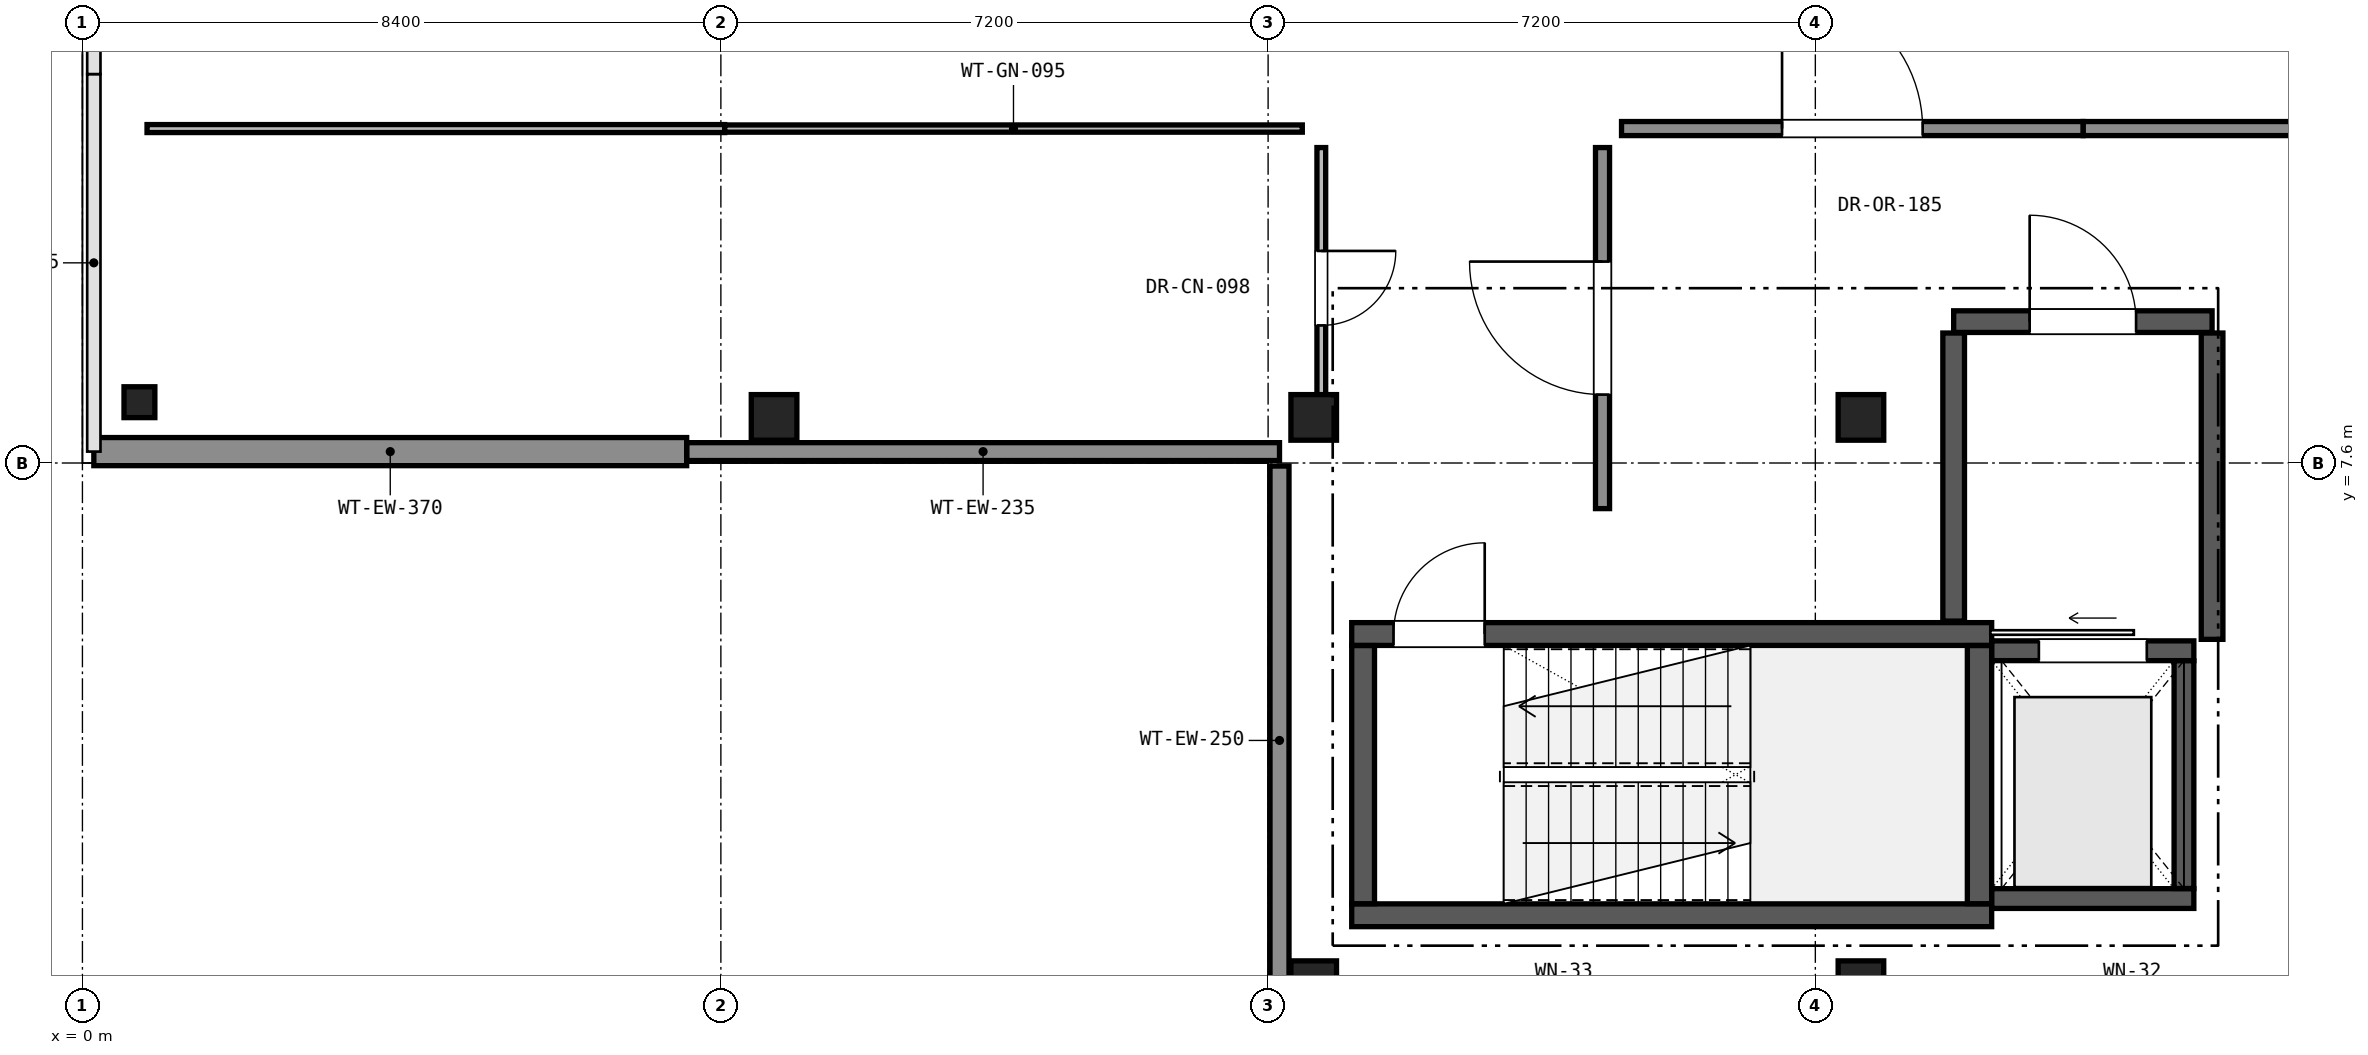
"""IFC4 building model, lengths in metres.
Left out: names, types, materials, properties, quantities, classifications, styles, units other than length and angle.
Written with IfcOpenShell. Run it as: python <this file> out.ifc"""

import sys

from ifc_helpers import new_model, si_unit, direction, frame, frame_2d, origin, origin_2d, place, context, subcontext, project, spatial, rectangle, hollow_circle, extrude, element, fill, save


model = new_model("IFC4")
c1 = context("Model", 3, precision=1e-05, world=origin(), true_north=direction((0.0, 1.0)))
c2 = subcontext(c1, "Body", "Model", "MODEL_VIEW")
j1 = project(units=[si_unit("LENGTHUNIT", "METRE"), si_unit("PLANEANGLEUNIT", "RADIAN")], contexts=[c1])
p1 = place(None, origin())
s1 = spatial("IfcSite", under=j1, at=p1, CompositionType="ELEMENT")
p2 = place(p1, origin())
s2 = spatial("IfcBuilding", under=s1, at=p2, CompositionType="ELEMENT")
p3 = place(p2, frame((0.0, 0.0, 13.6)))
s3 = spatial("IfcBuildingStorey", under=s2, at=p3, CompositionType="ELEMENT", Elevation=13.6)
p4 = place(p3, frame((0.75, 8.4, 0.0), z_axis=(0.0, 0.0, 1.0), x_axis=(1.0, 0.0, 0.0)))
e1 = element("IfcColumn", 1, at=p4, inside=s3, PredefinedType="COLUMN", context=c2, shape_type="SweptSolid", body=[
    extrude(hollow_circle(Radius=0.203, WallThickness=0.016, at=origin_2d()), origin(), (0.0, 0.0, 1.0), 4.08),
])
for number, where, z_axis, x_axis in (
    (2, (9.1, 8.2, 0.0), (0.0, 0.0, 1.0), (1.0, 0.0, 0.0)),
    (3, (16.2, 0.75, 0.0), (0.0, 0.0, 1.0), (1.0, 0.0, 0.0)),
    (4, (16.2, 8.2, 0.0), (0.0, 0.0, 1.0), (1.0, 0.0, 0.0)),
    (5, (23.4, 0.75, 0.0), (0.0, 0.0, 1.0), (1.0, 0.0, 0.0)),
    (6, (23.4, 8.2, 0.0), (0.0, 0.0, 1.0), (1.0, 0.0, 0.0)),
):
    element("IfcColumn", number, at=place(p3, frame(where, z_axis=z_axis, x_axis=x_axis)), inside=s3, PredefinedType="COLUMN", context=c2, shape_type="SweptSolid", body=[
        extrude(rectangle(XDim=0.6, YDim=0.6, at=origin_2d()), origin(), (0.0, 0.0, 1.0), 4.08),
    ])
p5 = place(p3, frame((15.75, 0.34, 0.0), z_axis=(0.0, 0.0, 1.0), x_axis=(0.0, 1.0, 0.0)))
e7 = element("IfcWall", 7, at=p5, inside=s3, PredefinedType="SOLIDWALL", context=c2, shape_type="SweptSolid", body=[
    extrude(rectangle(XDim=7.22, YDim=0.25, at=frame_2d((3.61, 0.0))), origin(), (0.0, 0.0, 1.0), 3.72),
])
p6 = place(p3, frame((15.75, 7.75, 0.0), z_axis=(0.0, 0.0, 1.0), x_axis=(-1.0, 0.0, 0.0)))
e8 = element("IfcWall", 8, at=p6, inside=s3, PredefinedType="SOLIDWALL", context=c2, shape_type="SweptSolid", body=[
    extrude(rectangle(XDim=7.8, YDim=0.235, at=frame_2d((3.9, 0.0))), origin(), (0.0, 0.0, 1.0), 3.72),
])
p7 = place(p3, frame((7.95, 7.75, 0.0), z_axis=(0.0, 0.0, 1.0), x_axis=(-1.0, 0.0, 0.0)))
e9 = element("IfcWall", 9, at=p7, inside=s3, PredefinedType="SOLIDWALL", context=c2, shape_type="SweptSolid", body=[
    extrude(rectangle(XDim=7.8, YDim=0.37, at=frame_2d((3.9, 0.0))), origin(), (0.0, 0.0, 1.0), 3.72),
])
p8 = place(p3, frame((16.7, 1.65, 0.0), z_axis=(0.0, 0.0, 1.0), x_axis=(1.0, 0.0, 0.0)))
e10 = element("IfcWall", 10, at=p8, inside=s3, PredefinedType="SHEAR", context=c2, shape_type="SweptSolid", body=[
    extrude(rectangle(XDim=8.42, YDim=0.3, at=frame_2d((4.21, 0.0))), origin(), (0.0, 0.0, 1.0), 3.72),
])
p9 = place(p3, frame((16.7, 5.35, 0.0), z_axis=(0.0, 0.0, 1.0), x_axis=(1.0, 0.0, 0.0)))
e11 = element("IfcWall", 11, at=p9, inside=s3, PredefinedType="SHEAR", context=c2, shape_type="SweptSolid", body=[
    extrude(rectangle(XDim=8.42, YDim=0.3, at=frame_2d((4.21, 0.0))), origin(), (0.0, 0.0, 1.0), 3.72),
])
p10 = place(p9, frame((0.55, 0.0, 0.0)))
e12 = element("IfcOpeningElement", 12, at=p10, cuts=e11, PredefinedType="OPENING", context=c2, shape_type="SweptSolid", body=[
    extrude(rectangle(XDim=1.2, YDim=2.2, at=frame_2d((0.6, 1.1))), frame((0.0, 0.16, 0.0), z_axis=(0.0, -1.0, 0.0), x_axis=(1.0, 0.0, 0.0)), (0.0, 0.0, 1.0), 0.32),
])
p11 = place(p3, frame((16.85, 1.802, 0.0), z_axis=(0.0, 0.0, 1.0), x_axis=(0.0, 1.0, 0.0)))
e13 = element("IfcWall", 13, at=p11, inside=s3, PredefinedType="SHEAR", context=c2, shape_type="SweptSolid", body=[
    extrude(rectangle(XDim=3.396, YDim=0.3, at=frame_2d((1.698, 0.0))), origin(), (0.0, 0.0, 1.0), 3.72),
])
p12 = place(p3, frame((24.96, 1.802, 0.0), z_axis=(0.0, 0.0, 1.0), x_axis=(0.0, 1.0, 0.0)))
e14 = element("IfcWall", 14, at=p12, inside=s3, PredefinedType="SHEAR", context=c2, shape_type="SweptSolid", body=[
    extrude(rectangle(XDim=3.396, YDim=0.32, at=frame_2d((1.698, 0.0))), origin(), (0.0, 0.0, 1.0), 3.72),
])
p13 = place(p3, frame((25.122, 1.87, 0.0), z_axis=(0.0, 0.0, 1.0), x_axis=(1.0, 0.0, 0.0)))
e15 = element("IfcWall", 15, at=p13, inside=s3, PredefinedType="SHEAR", context=c2, shape_type="SweptSolid", body=[
    extrude(rectangle(XDim=2.658, YDim=0.26, at=frame_2d((1.329, 0.0))), origin(), (0.0, 0.0, 1.0), 3.72),
])
p14 = place(p3, frame((25.122, 5.13, 0.0), z_axis=(0.0, 0.0, 1.0), x_axis=(1.0, 0.0, 0.0)))
e16 = element("IfcWall", 16, at=p14, inside=s3, PredefinedType="SHEAR", context=c2, shape_type="SweptSolid", body=[
    extrude(rectangle(XDim=2.658, YDim=0.26, at=frame_2d((1.329, 0.0))), origin(), (0.0, 0.0, 1.0), 3.72),
])
p15 = place(p14, frame((0.619, 0.0, 0.0)))
e17 = element("IfcOpeningElement", 17, at=p15, cuts=e16, PredefinedType="OPENING", context=c2, shape_type="SweptSolid", body=[
    extrude(rectangle(XDim=1.42, YDim=2.25, at=frame_2d((0.71, 1.125))), frame((0.0, 0.14, 0.0), z_axis=(0.0, -1.0, 0.0), x_axis=(1.0, 0.0, 0.0)), (0.0, 0.0, 1.0), 0.28),
])
p16 = place(p3, frame((27.65, 2.002, 0.0), z_axis=(0.0, 0.0, 1.0), x_axis=(0.0, 1.0, 0.0)))
e18 = element("IfcWall", 18, at=p16, inside=s3, PredefinedType="SHEAR", context=c2, shape_type="SweptSolid", body=[
    extrude(rectangle(XDim=2.996, YDim=0.26, at=frame_2d((1.498, 0.0))), origin(), (0.0, 0.0, 1.0), 3.72),
])
p17 = place(p3, frame((24.62, 9.46, 0.0), z_axis=(0.0, 0.0, 1.0), x_axis=(1.0, 0.0, 0.0)))
e19 = element("IfcWall", 19, at=p17, inside=s3, PredefinedType="SHEAR", context=c2, shape_type="SweptSolid", body=[
    extrude(rectangle(XDim=3.4, YDim=0.285, at=frame_2d((1.7, 0.0))), origin(), (0.0, 0.0, 1.0), 3.72),
])
p18 = place(p17, frame((1.0, 0.0, 0.0)))
e20 = element("IfcOpeningElement", 20, at=p18, cuts=e19, PredefinedType="OPENING", context=c2, shape_type="SweptSolid", body=[
    extrude(rectangle(XDim=1.4, YDim=2.25, at=frame_2d((0.7, 1.125))), frame((0.0, 0.152, 0.0), z_axis=(0.0, -1.0, 0.0), x_axis=(1.0, 0.0, 0.0)), (0.0, 0.0, 1.0), 0.305),
])
p19 = place(p3, frame((24.62, 5.52, 0.0), z_axis=(0.0, 0.0, 1.0), x_axis=(0.0, 1.0, 0.0)))
e21 = element("IfcWall", 21, at=p19, inside=s3, PredefinedType="SHEAR", context=c2, shape_type="SweptSolid", body=[
    extrude(rectangle(XDim=3.79, YDim=0.285, at=frame_2d((1.895, 0.0))), origin(), (0.0, 0.0, 1.0), 2.77),
])
p20 = place(p3, frame((28.02, 5.28, 0.0), z_axis=(0.0, 0.0, 1.0), x_axis=(0.0, 1.0, 0.0)))
e22 = element("IfcWall", 22, at=p20, inside=s3, PredefinedType="SHEAR", context=c2, shape_type="SweptSolid", body=[
    extrude(rectangle(XDim=4.03, YDim=0.285, at=frame_2d((2.015, 0.0))), origin(), (0.0, 0.0, 1.0), 2.77),
])
p21 = place(p3, frame((20.0, 7.0, 0.0), z_axis=(0.0, 0.0, 1.0), x_axis=(0.0, 1.0, 0.0)))
e23 = element("IfcWall", 23, at=p21, inside=s3, PredefinedType="PARTITIONING", context=c2, shape_type="SweptSolid", body=[
    extrude(rectangle(XDim=4.75, YDim=0.185, at=frame_2d((2.375, 0.0))), origin(), (0.0, 0.0, 1.0), 2.77),
])
p22 = place(p21, frame((1.5, 0.0, 0.0)))
e24 = element("IfcOpeningElement", 24, at=p22, cuts=e23, PredefinedType="OPENING", context=c2, shape_type="SweptSolid", body=[
    extrude(rectangle(XDim=1.75, YDim=2.4, at=frame_2d((0.875, 1.2))), frame((0.0, 0.103, 0.0), z_axis=(0.0, -1.0, 0.0), x_axis=(1.0, 0.0, 0.0)), (0.0, 0.0, 1.0), 0.205),
])
p23 = place(p3, frame((20.25, 12.0, 0.0), z_axis=(0.0, 0.0, 1.0), x_axis=(1.0, 0.0, 0.0)))
e25 = element("IfcWall", 25, at=p23, inside=s3, PredefinedType="PARTITIONING", context=c2, shape_type="SweptSolid", body=[
    extrude(rectangle(XDim=6.075, YDim=0.185, at=frame_2d((3.038, 0.0))), origin(), (0.0, 0.0, 1.0), 3.17),
])
p24 = place(p23, frame((2.112, 0.0, 0.0)))
e26 = element("IfcOpeningElement", 26, at=p24, cuts=e25, PredefinedType="OPENING", context=c2, shape_type="SweptSolid", body=[
    extrude(rectangle(XDim=1.85, YDim=2.4, at=frame_2d((0.925, 1.2))), frame((0.0, 0.103, 0.0), z_axis=(0.0, -1.0, 0.0), x_axis=(1.0, 0.0, 0.0)), (0.0, 0.0, 1.0), 0.205),
])
p25 = place(p3, frame((26.325, 12.0, 0.0), z_axis=(0.0, 0.0, 1.0), x_axis=(1.0, 0.0, 0.0)))
e27 = element("IfcWall", 27, at=p25, inside=s3, PredefinedType="PARTITIONING", context=c2, shape_type="SweptSolid", body=[
    extrude(rectangle(XDim=6.075, YDim=0.185, at=frame_2d((3.038, 0.0))), origin(), (0.0, 0.0, 1.0), 3.02),
])
p26 = place(p3, frame((16.3, 11.75, 0.0), z_axis=(0.0, 0.0, 1.0), x_axis=(0.0, -1.0, 0.0)))
e28 = element("IfcWall", 28, at=p26, inside=s3, PredefinedType="PARTITIONING", context=c2, shape_type="SweptSolid", body=[
    extrude(rectangle(XDim=3.7, YDim=0.115, at=frame_2d((1.85, 0.0))), origin(), (0.0, 0.0, 1.0), 2.77),
])
p27 = place(p26, frame((1.36, 0.0, 0.0)))
e29 = element("IfcOpeningElement", 29, at=p27, cuts=e28, PredefinedType="OPENING", context=c2, shape_type="SweptSolid", body=[
    extrude(rectangle(XDim=0.98, YDim=2.15, at=frame_2d((0.49, 1.075))), frame((0.0, 0.067, 0.0), z_axis=(0.0, -1.0, 0.0), x_axis=(1.0, 0.0, 0.0)), (0.0, 0.0, 1.0), 0.135),
])
p28 = place(p3, frame((0.85, 12.0, 0.0), z_axis=(0.0, 0.0, 1.0), x_axis=(1.0, 0.0, 0.0)))
e30 = element("IfcWall", 30, at=p28, inside=s3, PredefinedType="PARTITIONING", context=c2, shape_type="SweptSolid", body=[
    extrude(rectangle(XDim=7.6, YDim=0.105, at=frame_2d((3.8, 0.0))), origin(), (0.0, 0.0, 1.0), 3.31),
])
p29 = place(p3, frame((8.45, 12.0, 0.0), z_axis=(0.0, 0.0, 1.0), x_axis=(1.0, 0.0, 0.0)))
e31 = element("IfcWall", 31, at=p29, inside=s3, PredefinedType="PARTITIONING", context=c2, shape_type="SweptSolid", body=[
    extrude(rectangle(XDim=7.6, YDim=0.095, at=frame_2d((3.8, 0.0))), origin(), (0.0, 0.0, 1.0), 2.97),
])
p30 = place(p10, origin())
e32 = element("IfcDoor", 32, at=p30, inside=s3, OperationType="SINGLE_SWING_RIGHT", PredefinedType="DOOR", context=c2, shape_type="SweptSolid", body=[
    extrude(rectangle(XDim=1.2, YDim=2.2, at=frame_2d((0.6, 1.1))), frame((0.0, 0.025, 0.0), z_axis=(0.0, -1.0, 0.0), x_axis=(1.0, 0.0, 0.0)), (0.0, 0.0, 1.0), 0.05),
])
fill(e12, e32)
p31 = place(p15, origin())
e33 = element("IfcDoor", 33, at=p31, inside=s3, OperationType="SLIDING_TO_LEFT", PredefinedType="DOOR", context=c2, shape_type="SweptSolid", body=[
    extrude(rectangle(XDim=1.42, YDim=2.25, at=frame_2d((0.71, 1.125))), frame((0.0, 0.025, 0.0), z_axis=(0.0, -1.0, 0.0), x_axis=(1.0, 0.0, 0.0)), (0.0, 0.0, 1.0), 0.05),
])
fill(e17, e33)
p32 = place(p18, origin())
e34 = element("IfcDoor", 34, at=p32, inside=s3, OperationType="SINGLE_SWING_LEFT", PredefinedType="DOOR", context=c2, shape_type="SweptSolid", body=[
    extrude(rectangle(XDim=1.4, YDim=2.25, at=frame_2d((0.7, 1.125))), frame((0.0, 0.025, 0.0), z_axis=(0.0, -1.0, 0.0), x_axis=(1.0, 0.0, 0.0)), (0.0, 0.0, 1.0), 0.05),
])
fill(e20, e34)
p33 = place(p22, origin())
e35 = element("IfcDoor", 35, at=p33, inside=s3, OperationType="SINGLE_SWING_RIGHT", PredefinedType="DOOR", context=c2, shape_type="SweptSolid", body=[
    extrude(rectangle(XDim=1.75, YDim=2.4, at=frame_2d((0.875, 1.2))), frame((0.0, 0.025, 0.0), z_axis=(0.0, -1.0, 0.0), x_axis=(1.0, 0.0, 0.0)), (0.0, 0.0, 1.0), 0.05),
])
fill(e24, e35)
p34 = place(p24, origin())
e36 = element("IfcDoor", 36, at=p34, inside=s3, OperationType="SINGLE_SWING_LEFT", PredefinedType="DOOR", context=c2, shape_type="SweptSolid", body=[
    extrude(rectangle(XDim=1.85, YDim=2.4, at=frame_2d((0.925, 1.2))), frame((0.0, 0.025, 0.0), z_axis=(0.0, -1.0, 0.0), x_axis=(1.0, 0.0, 0.0)), (0.0, 0.0, 1.0), 0.05),
])
fill(e26, e36)
p35 = place(p27, origin())
e37 = element("IfcDoor", 37, at=p35, inside=s3, OperationType="SINGLE_SWING_LEFT", PredefinedType="DOOR", context=c2, shape_type="SweptSolid", body=[
    extrude(rectangle(XDim=0.98, YDim=2.15, at=frame_2d((0.49, 1.075))), frame((0.0, 0.025, 0.0), z_axis=(0.0, -1.0, 0.0), x_axis=(1.0, 0.0, 0.0)), (0.0, 0.0, 1.0), 0.05),
])
fill(e29, e37)
save(model, sys.argv[1])
